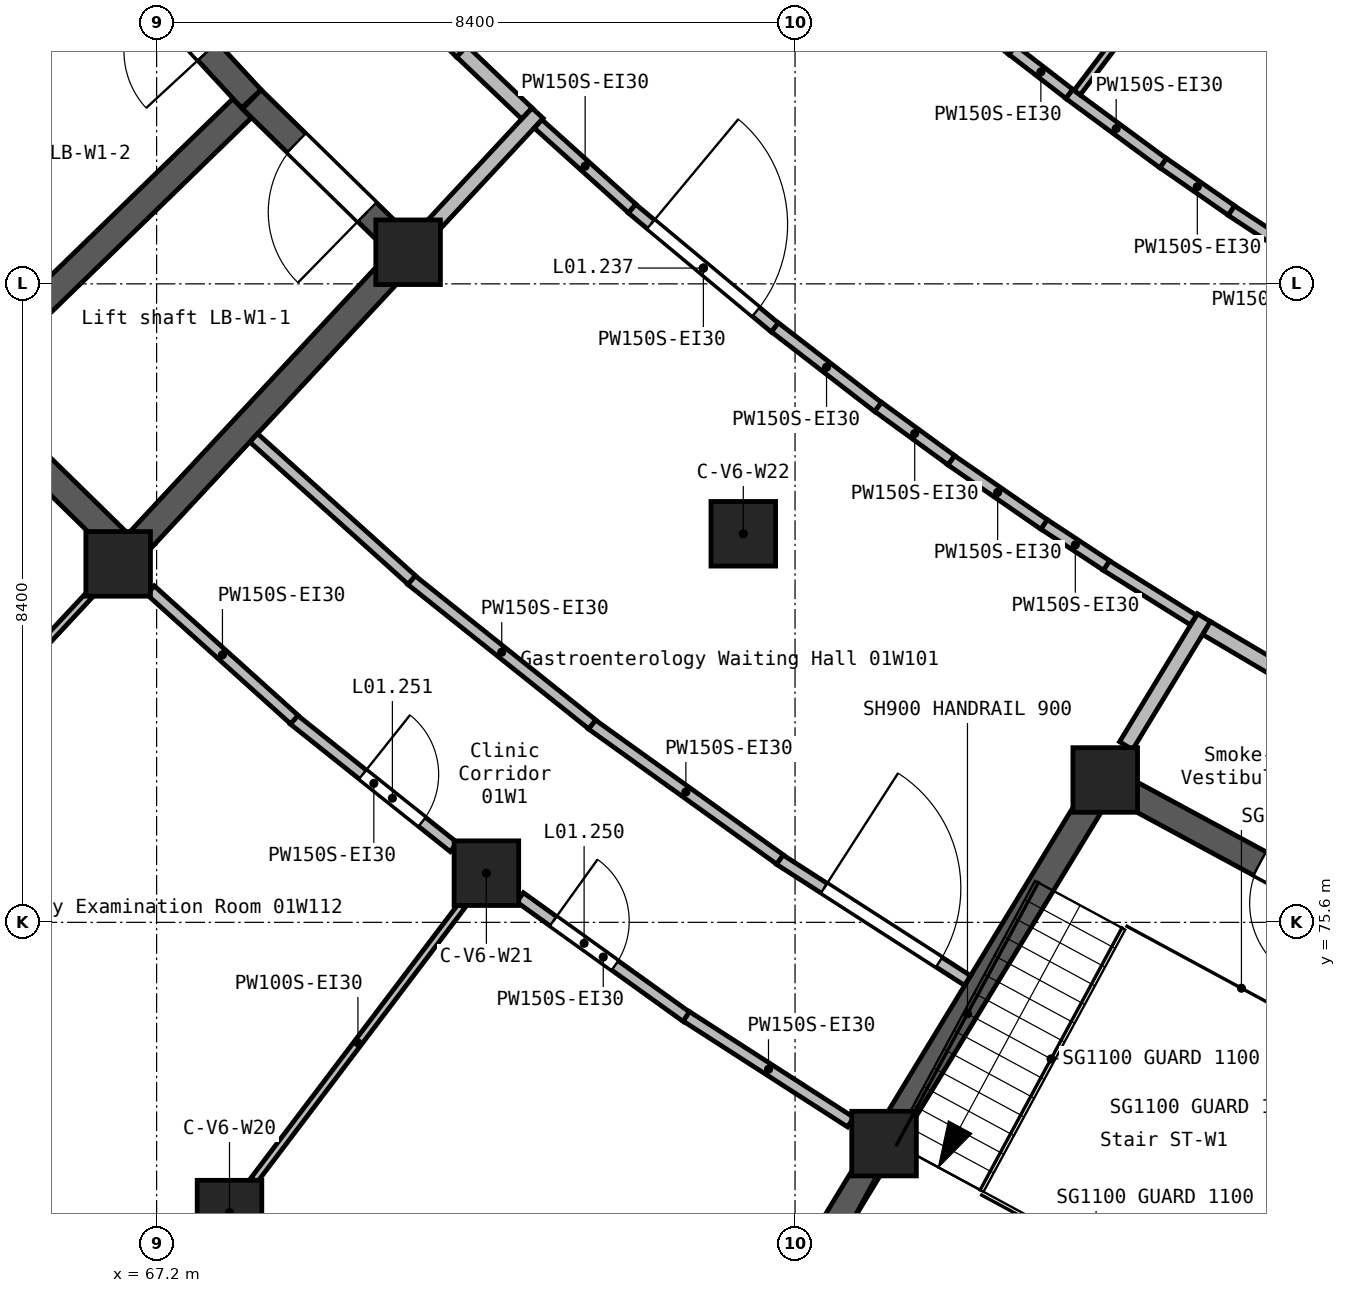
"""IFC4 building model, lengths in metres.
Left out: names, types, materials, properties, quantities, classifications, styles, units other than length and angle.
Written with IfcOpenShell. Run it as: python <this file> out.ifc"""

import sys

from ifc_helpers import new_model, si_unit, direction, frame, frame_2d, origin, origin_2d, place, context, subcontext, project, spatial, rectangle, extrude, element, fill, save


model = new_model("IFC4")
c1 = context("Model", 3, precision=1e-05, world=origin(), true_north=direction((0.0, 1.0)))
c2 = subcontext(c1, "Body", "Model", "MODEL_VIEW")
j1 = project(units=[si_unit("LENGTHUNIT", "METRE"), si_unit("PLANEANGLEUNIT", "RADIAN")], contexts=[c1])
p1 = place(None, origin())
s1 = spatial("IfcSite", under=j1, at=p1, CompositionType="ELEMENT")
p2 = place(p1, origin())
s2 = spatial("IfcBuilding", under=s1, at=p2, CompositionType="ELEMENT")
p3 = place(p2, frame((0.0, 0.0, 5.4)))
s3 = spatial("IfcBuildingStorey", under=s2, at=p3, CompositionType="ELEMENT", Elevation=5.4)
for number, where, z_axis, x_axis in (
    (1, (66.694, 80.316, 0.0), (0.0, 0.0, 1.0), (1.0, 0.0, 0.0)),
    (2, (68.159, 71.781, 0.0), (0.0, 0.0, 1.0), (1.0, 0.0, 0.0)),
    (3, (70.509, 84.416, 0.0), (0.0, 0.0, 1.0), (1.0, 0.0, 0.0)),
    (4, (71.539, 76.247, 0.0), (0.0, 0.0, 1.0), (1.0, 0.0, 0.0)),
    (5, (74.919, 80.712, 0.0), (0.0, 0.0, 1.0), (1.0, 0.0, 0.0)),
    (6, (76.771, 72.689, 0.0), (0.0, 0.0, 1.0), (1.0, 0.0, 0.0)),
    (7, (79.681, 77.473, 0.0), (0.0, 0.0, 1.0), (1.0, 0.0, 0.0)),
):
    element("IfcColumn", number, at=place(p3, frame(where, z_axis=z_axis, x_axis=x_axis)), inside=s3, PredefinedType="COLUMN", context=c2, shape_type="SweptSolid", body=[
        extrude(rectangle(XDim=0.85, YDim=0.85, at=origin_2d()), origin(), (0.0, 0.0, 1.0), 4.5),
    ])
p4 = place(p3, frame((62.305, 84.872, 0.0), z_axis=(0.0, 0.0, 1.0), x_axis=(0.751808220443, 0.659381831471, 0.0)))
e8 = element("IfcWall", 8, at=p4, inside=s3, PredefinedType="SHEAR", context=c2, shape_type="SweptSolid", body=[
    extrude(rectangle(XDim=5.75, YDim=0.35, at=frame_2d((2.875, 0.0))), origin(), (0.0, 0.0, 1.0), 4.5),
])
p5 = place(p3, frame((64.579, 82.666, 0.0), z_axis=(0.0, 0.0, 1.0), x_axis=(0.714695816666, -0.699435407769, 0.0)))
e9 = element("IfcWall", 9, at=p5, inside=s3, PredefinedType="SHEAR", context=c2, shape_type="SweptSolid", body=[
    extrude(rectangle(XDim=2.976, YDim=0.35, at=frame_2d((1.488, 0.0))), origin(), (0.0, 0.0, 1.0), 4.5),
])
p6 = place(p3, frame((64.702, 82.791, 0.0), z_axis=(0.0, 0.0, 1.0), x_axis=(0.717400873641, 0.696660596345, 0.0)))
e10 = element("IfcWall", 10, at=p6, inside=s3, PredefinedType="SHEAR", context=c2, shape_type="SweptSolid", body=[
    extrude(rectangle(XDim=5.05, YDim=0.35, at=frame_2d((2.525, 0.0))), origin(), (0.0, 0.0, 1.0), 4.5),
])
p7 = place(p3, frame((66.712, 80.334, 0.0), z_axis=(0.0, 0.0, 1.0), x_axis=(0.681084356202, 0.732204957465, 0.0)))
e11 = element("IfcWall", 11, at=p7, inside=s3, PredefinedType="SHEAR", context=c2, shape_type="SweptSolid", body=[
    extrude(rectangle(XDim=5.75, YDim=0.35, at=frame_2d((2.875, 0.0))), origin(), (0.0, 0.0, 1.0), 4.5),
])
p8 = place(p3, frame((68.447, 86.434, 0.0), z_axis=(0.0, 0.0, 1.0), x_axis=(-0.678058558992, 0.735007884704, 0.0)))
e12 = element("IfcWall", 12, at=p8, inside=s3, PredefinedType="SHEAR", context=c2, shape_type="SweptSolid", body=[
    extrude(rectangle(XDim=2.701, YDim=0.35, at=frame_2d((1.35, 0.0))), origin(), (0.0, 0.0, 1.0), 4.5),
])
p9 = place(p8, frame((0.85, 0.0, 0.0)))
e13 = element("IfcOpeningElement", 13, at=p9, cuts=e12, PredefinedType="OPENING", context=c2, shape_type="SweptSolid", body=[
    extrude(rectangle(XDim=1.1, YDim=2.1, at=frame_2d((0.55, 1.05))), frame((0.0, 0.185, 0.0), z_axis=(0.0, -1.0, 0.0), x_axis=(1.0, 0.0, 0.0)), (0.0, 0.0, 1.0), 0.37),
])
p10 = place(p3, frame((70.384, 84.538, 0.0), z_axis=(0.0, 0.0, 1.0), x_axis=(-0.714701443082, 0.699429658548, 0.0)))
e14 = element("IfcWall", 14, at=p10, inside=s3, PredefinedType="SHEAR", context=c2, shape_type="SweptSolid", body=[
    extrude(rectangle(XDim=2.702, YDim=0.35, at=frame_2d((1.351, 0.0))), origin(), (0.0, 0.0, 1.0), 4.5),
])
p11 = place(p10, frame((0.581, 0.0, 0.0)))
e15 = element("IfcOpeningElement", 15, at=p11, cuts=e14, PredefinedType="OPENING", context=c2, shape_type="SweptSolid", body=[
    extrude(rectangle(XDim=1.3, YDim=2.1, at=frame_2d((0.65, 1.05))), frame((0.0, 0.185, 0.0), z_axis=(0.0, -1.0, 0.0), x_axis=(1.0, 0.0, 0.0)), (0.0, 0.0, 1.0), 0.37),
])
p12 = place(p3, frame((75.848, 71.173, 0.0), z_axis=(0.0, 0.0, 1.0), x_axis=(0.51973149438, 0.854329663391, 0.0)))
e16 = element("IfcWall", 16, at=p12, inside=s3, PredefinedType="SHEAR", context=c2, shape_type="SweptSolid", body=[
    extrude(rectangle(XDim=7.55, YDim=0.35, at=frame_2d((3.775, 0.0))), origin(), (0.0, 0.0, 1.0), 4.5),
])
p13 = place(p3, frame((81.572, 68.077, 0.0), z_axis=(0.0, 0.0, 1.0), x_axis=(0.430592498036, 0.90254645345, 0.0)))
e17 = element("IfcWall", 17, at=p13, inside=s3, PredefinedType="SHEAR", context=c2, shape_type="SweptSolid", body=[
    extrude(rectangle(XDim=7.55, YDim=0.35, at=frame_2d((3.775, 0.0))), origin(), (0.0, 0.0, 1.0), 4.5),
])
p14 = place(p3, frame((84.593, 74.816, 0.0), z_axis=(0.0, 0.0, 1.0), x_axis=(-0.879585553739, 0.475740742058, 0.0)))
e18 = element("IfcWall", 18, at=p14, inside=s3, PredefinedType="SHEAR", context=c2, shape_type="SweptSolid", body=[
    extrude(rectangle(XDim=5.409, YDim=0.35, at=frame_2d((2.705, 0.0))), origin(), (0.0, 0.0, 1.0), 4.5),
])
p15 = place(p14, frame((2.174, 0.0, 0.0)))
e19 = element("IfcOpeningElement", 19, at=p15, cuts=e18, PredefinedType="OPENING", context=c2, shape_type="SweptSolid", body=[
    extrude(rectangle(XDim=1.1, YDim=2.1, at=frame_2d((0.55, 1.05))), frame((0.0, 0.185, 0.0), z_axis=(0.0, -1.0, 0.0), x_axis=(1.0, 0.0, 0.0)), (0.0, 0.0, 1.0), 0.37),
])
p16 = place(p3, frame((67.039, 70.31, 0.0), z_axis=(0.0, 0.0, 1.0), x_axis=(-0.76581638303, 0.64305930324, 0.0)))
e20 = element("IfcWall", 20, at=p16, inside=s3, PredefinedType="STANDARD", context=c2, shape_type="SweptSolid", body=[
    extrude(rectangle(XDim=7.072, YDim=0.2, at=frame_2d((3.536, 0.0))), origin(), (0.0, 0.0, 1.0), 3.35),
])
p17 = place(p16, frame((2.946, 0.0, 0.0)))
e21 = element("IfcOpeningElement", 21, at=p17, cuts=e20, PredefinedType="OPENING", context=c2, shape_type="SweptSolid", body=[
    extrude(rectangle(XDim=1.8, YDim=2.4, at=frame_2d((0.9, 1.2))), frame((0.0, 0.11, 0.0), z_axis=(0.0, -1.0, 0.0), x_axis=(1.0, 0.0, 0.0)), (0.0, 0.0, 1.0), 0.22),
])
p18 = place(p3, frame((70.837, 84.769, 0.0), z_axis=(0.0, 0.0, 1.0), x_axis=(0.681244203436, 0.732056237789, 0.0)))
e22 = element("IfcWall", 22, at=p18, inside=s3, PredefinedType="SOLIDWALL", context=c2, shape_type="SweptSolid", body=[
    extrude(rectangle(XDim=2.018, YDim=0.2, at=frame_2d((1.009, 0.0))), origin(), (0.0, 0.0, 1.0), 4.15),
])
p19 = place(p3, frame((79.955, 77.924, 0.0), z_axis=(0.0, 0.0, 1.0), x_axis=(0.519675881268, 0.85436349315, 0.0)))
e23 = element("IfcWall", 23, at=p19, inside=s3, PredefinedType="SOLIDWALL", context=c2, shape_type="SweptSolid", body=[
    extrude(rectangle(XDim=1.972, YDim=0.2, at=frame_2d((0.986, 0.0))), origin(), (0.0, 0.0, 1.0), 4.15),
])
p20 = place(p3, frame((70.101, 88.174, 0.0), z_axis=(0.0, 0.0, 1.0), x_axis=(0.705714994949, -0.708495833371, 0.0)))
e24 = element("IfcWall", 24, at=p20, inside=s3, PredefinedType="SOLIDWALL", context=c2, shape_type="SweptSolid", body=[
    extrude(rectangle(XDim=1.58, YDim=0.2, at=frame_2d((0.79, 0.0))), origin(), (0.0, 0.0, 1.0), 4.15),
])
p21 = place(p20, frame((0.19, 0.0, 0.0)))
e25 = element("IfcOpeningElement", 25, at=p21, cuts=e24, PredefinedType="OPENING", context=c2, shape_type="SweptSolid", body=[
    extrude(rectangle(XDim=1.2, YDim=2.1, at=frame_2d((0.6, 1.05))), frame((0.0, 0.11, 0.0), z_axis=(0.0, -1.0, 0.0), x_axis=(1.0, 0.0, 0.0)), (0.0, 0.0, 1.0), 0.22),
])
p22 = place(p3, frame((81.015, 79.471, 0.0), z_axis=(0.0, 0.0, 1.0), x_axis=(0.860926528214, -0.508729312127, 0.0)))
e26 = element("IfcWall", 26, at=p22, inside=s3, PredefinedType="SOLIDWALL", context=c2, shape_type="SweptSolid", body=[
    extrude(rectangle(XDim=1.379, YDim=0.2, at=frame_2d((0.689, 0.0))), origin(), (0.0, 0.0, 1.0), 4.15),
])
p23 = place(p3, frame((71.217, 87.058, 0.0), z_axis=(0.0, 0.0, 1.0), x_axis=(0.723660671666, -0.6901559478, 0.0)))
e27 = element("IfcWall", 27, at=p23, inside=s3, PredefinedType="SOLIDWALL", context=c2, shape_type="SweptSolid", body=[
    extrude(rectangle(XDim=1.18, YDim=0.2, at=frame_2d((0.59, 0.0))), origin(), (0.0, 0.0, 1.0), 4.15),
])
p24 = place(p3, frame((71.982, 75.929, 0.0), z_axis=(0.0, 0.0, 1.0), x_axis=(0.812329236441, -0.583199118332, 0.0)))
e28 = element("IfcWall", 28, at=p24, inside=s3, PredefinedType="PARTITIONING", context=c2, shape_type="SweptSolid", body=[
    extrude(rectangle(XDim=2.695, YDim=0.15, at=frame_2d((1.347, 0.0))), origin(), (0.0, 0.0, 1.0), 4.15),
])
p25 = place(p24, frame((0.537, 0.0, 0.0)))
e29 = element("IfcOpeningElement", 29, at=p25, cuts=e28, PredefinedType="OPENING", context=c2, shape_type="SweptSolid", body=[
    extrude(rectangle(XDim=1.0, YDim=2.1, at=frame_2d((0.5, 1.05))), frame((0.0, 0.085, 0.0), z_axis=(0.0, -1.0, 0.0), x_axis=(1.0, 0.0, 0.0)), (0.0, 0.0, 1.0), 0.17),
])
p26 = place(p3, frame((69.006, 78.267, 0.0), z_axis=(0.0, 0.0, 1.0), x_axis=(0.781841800916, -0.623476862715, 0.0)))
e30 = element("IfcWall", 30, at=p26, inside=s3, PredefinedType="PARTITIONING", context=c2, shape_type="SweptSolid", body=[
    extrude(rectangle(XDim=2.69, YDim=0.15, at=frame_2d((1.345, 0.0))), origin(), (0.0, 0.0, 1.0), 4.15),
])
p27 = place(p26, frame((1.157, 0.0, 0.0)))
e31 = element("IfcOpeningElement", 31, at=p27, cuts=e30, PredefinedType="OPENING", context=c2, shape_type="SweptSolid", body=[
    extrude(rectangle(XDim=1.0, YDim=2.1, at=frame_2d((0.5, 1.05))), frame((0.0, 0.085, 0.0), z_axis=(0.0, -1.0, 0.0), x_axis=(1.0, 0.0, 0.0)), (0.0, 0.0, 1.0), 0.17),
])
p28 = place(p3, frame((74.17, 74.362, 0.0), z_axis=(0.0, 0.0, 1.0), x_axis=(0.840928399131, -0.541146401203, 0.0)))
e32 = element("IfcWall", 32, at=p28, inside=s3, PredefinedType="PARTITIONING", context=c2, shape_type="SweptSolid", body=[
    extrude(rectangle(XDim=2.57, YDim=0.15, at=frame_2d((1.285, 0.0))), origin(), (0.0, 0.0, 1.0), 4.15),
])
p29 = place(p3, frame((67.12, 79.971, 0.0), z_axis=(0.0, 0.0, 1.0), x_axis=(0.743284610851, -0.668975326355, 0.0)))
e33 = element("IfcWall", 33, at=p29, inside=s3, PredefinedType="PARTITIONING", context=c2, shape_type="SweptSolid", body=[
    extrude(rectangle(XDim=2.546, YDim=0.15, at=frame_2d((1.273, 0.0))), origin(), (0.0, 0.0, 1.0), 4.15),
])
p30 = place(p3, frame((75.396, 76.427, 0.0), z_axis=(0.0, 0.0, 1.0), x_axis=(0.840919451001, -0.541160306128, 0.0)))
e34 = element("IfcWall", 34, at=p30, inside=s3, PredefinedType="PARTITIONING", context=c2, shape_type="SweptSolid", body=[
    extrude(rectangle(XDim=2.941, YDim=0.15, at=frame_2d((1.47, 0.0))), origin(), (0.0, 0.0, 1.0), 4.15),
])
p31 = place(p30, frame((0.697, 0.0, 0.0)))
e35 = element("IfcOpeningElement", 35, at=p31, cuts=e34, PredefinedType="OPENING", context=c2, shape_type="SweptSolid", body=[
    extrude(rectangle(XDim=1.8, YDim=2.1, at=frame_2d((0.9, 1.05))), frame((0.0, 0.085, 0.0), z_axis=(0.0, -1.0, 0.0), x_axis=(1.0, 0.0, 0.0)), (0.0, 0.0, 1.0), 0.17),
])
for number, where, z_axis, x_axis in (
    (36, (72.926, 78.204, 0.0), (0.0, 0.0, 1.0), (0.812, -0.583, 0.0)),
    (37, (70.55, 80.105, 0.0), (0.0, 0.0, 1.0), (0.782, -0.624, 0.0)),
):
    element("IfcWall", number, at=place(p3, frame(where, z_axis=z_axis, x_axis=x_axis)), inside=s3, PredefinedType="PARTITIONING", context=c2, shape_type="SweptSolid", body=[
        extrude(rectangle(XDim=3.046, YDim=0.15, at=frame_2d((1.523, 0.0))), origin(), (0.0, 0.0, 1.0), 4.15),
    ])
p32 = place(p3, frame((68.478, 81.974, 0.0), z_axis=(0.0, 0.0, 1.0), x_axis=(0.743546016741, -0.66868476952, 0.0)))
e38 = element("IfcWall", 38, at=p32, inside=s3, PredefinedType="PARTITIONING", context=c2, shape_type="SweptSolid", body=[
    extrude(rectangle(XDim=2.795, YDim=0.15, at=frame_2d((1.397, 0.0))), origin(), (0.0, 0.0, 1.0), 4.15),
])
p33 = place(p3, frame((73.452, 84.992, 0.0), z_axis=(0.0, 0.0, 1.0), x_axis=(0.768531506517, -0.639811943849, 0.0)))
e39 = element("IfcWall", 39, at=p33, inside=s3, PredefinedType="PARTITIONING", context=c2, shape_type="SweptSolid", body=[
    extrude(rectangle(XDim=2.45, YDim=0.15, at=frame_2d((1.225, 0.0))), origin(), (0.0, 0.0, 1.0), 4.15),
])
p34 = place(p33, frame((0.325, 0.0, 0.0)))
e40 = element("IfcOpeningElement", 40, at=p34, cuts=e39, PredefinedType="OPENING", context=c2, shape_type="SweptSolid", body=[
    extrude(rectangle(XDim=1.8, YDim=2.1, at=frame_2d((0.9, 1.05))), frame((0.0, 0.085, 0.0), z_axis=(0.0, -1.0, 0.0), x_axis=(1.0, 0.0, 0.0)), (0.0, 0.0, 1.0), 0.17),
])
p35 = place(p3, frame((72.22, 86.105, 0.0), z_axis=(0.0, 0.0, 1.0), x_axis=(0.743337937966, -0.668916070954, 0.0)))
e41 = element("IfcWall", 41, at=p35, inside=s3, PredefinedType="PARTITIONING", context=c2, shape_type="SweptSolid", body=[
    extrude(rectangle(XDim=1.663, YDim=0.15, at=frame_2d((0.832, 0.0))), origin(), (0.0, 0.0, 1.0), 4.15),
])
p36 = place(p3, frame((77.051, 88.236, 0.0), z_axis=(0.0, 0.0, 1.0), x_axis=(0.771517511576, -0.636208086502, 0.0)))
e42 = element("IfcWall", 42, at=p36, inside=s3, PredefinedType="PARTITIONING", context=c2, shape_type="SweptSolid", body=[
    extrude(rectangle(XDim=1.828, YDim=0.15, at=frame_2d((0.914, 0.0))), origin(), (0.0, 0.0, 1.0), 4.15),
])
p37 = place(p3, frame((75.335, 83.428, 0.0), z_axis=(0.0, 0.0, 1.0), x_axis=(0.791538398042, -0.611119435483, 0.0)))
e43 = element("IfcWall", 43, at=p37, inside=s3, PredefinedType="PARTITIONING", context=c2, shape_type="SweptSolid", body=[
    extrude(rectangle(XDim=1.716, YDim=0.15, at=frame_2d((0.858, 0.0))), origin(), (0.0, 0.0, 1.0), 4.15),
])
p38 = place(p3, frame((79.206, 86.5, 0.0), z_axis=(0.0, 0.0, 1.0), x_axis=(0.804960127747, -0.593328907721, 0.0)))
e44 = element("IfcWall", 44, at=p38, inside=s3, PredefinedType="PARTITIONING", context=c2, shape_type="SweptSolid", body=[
    extrude(rectangle(XDim=1.539, YDim=0.15, at=frame_2d((0.77, 0.0))), origin(), (0.0, 0.0, 1.0), 4.15),
])
p39 = place(p3, frame((79.695, 80.295, 0.0), z_axis=(0.0, 0.0, 1.0), x_axis=(0.847541618724, -0.530728936964, 0.0)))
e45 = element("IfcWall", 45, at=p39, inside=s3, PredefinedType="PARTITIONING", context=c2, shape_type="SweptSolid", body=[
    extrude(rectangle(XDim=1.353, YDim=0.15, at=frame_2d((0.676, 0.0))), origin(), (0.0, 0.0, 1.0), 4.15),
])
p40 = place(p3, frame((77.653, 81.68, 0.0), z_axis=(0.0, 0.0, 1.0), x_axis=(0.822646640465, -0.568552992194, 0.0)))
e46 = element("IfcWall", 46, at=p40, inside=s3, PredefinedType="PARTITIONING", context=c2, shape_type="SweptSolid", body=[
    extrude(rectangle(XDim=1.488, YDim=0.15, at=frame_2d((0.744, 0.0))), origin(), (0.0, 0.0, 1.0), 4.15),
])
p41 = place(p3, frame((76.693, 82.382, 0.0), z_axis=(0.0, 0.0, 1.0), x_axis=(0.808088805309, -0.589060678312, 0.0)))
e47 = element("IfcWall", 47, at=p41, inside=s3, PredefinedType="PARTITIONING", context=c2, shape_type="SweptSolid", body=[
    extrude(rectangle(XDim=1.192, YDim=0.15, at=frame_2d((0.596, 0.0))), origin(), (0.0, 0.0, 1.0), 4.15),
])
p42 = place(p3, frame((81.338, 84.965, 0.0), z_axis=(0.0, 0.0, 1.0), x_axis=(0.834958204617, -0.550313362134, 0.0)))
e48 = element("IfcWall", 48, at=p42, inside=s3, PredefinedType="PARTITIONING", context=c2, shape_type="SweptSolid", body=[
    extrude(rectangle(XDim=1.389, YDim=0.15, at=frame_2d((0.695, 0.0))), origin(), (0.0, 0.0, 1.0), 4.15),
])
p43 = place(p3, frame((80.444, 85.589, 0.0), z_axis=(0.0, 0.0, 1.0), x_axis=(0.821096473197, -0.570789437274, 0.0)))
e49 = element("IfcWall", 49, at=p43, inside=s3, PredefinedType="PARTITIONING", context=c2, shape_type="SweptSolid", body=[
    extrude(rectangle(XDim=1.093, YDim=0.15, at=frame_2d((0.546, 0.0))), origin(), (0.0, 0.0, 1.0), 4.15),
])
p44 = place(p3, frame((78.877, 80.836, 0.0), z_axis=(0.0, 0.0, 1.0), x_axis=(0.835209839134, -0.549931381733, 0.0)))
e50 = element("IfcWall", 50, at=p44, inside=s3, PredefinedType="PARTITIONING", context=c2, shape_type="SweptSolid", body=[
    extrude(rectangle(XDim=0.982, YDim=0.15, at=frame_2d((0.491, 0.0))), origin(), (0.0, 0.0, 1.0), 4.15),
])
p45 = place(p3, frame((78.46, 87.077, 0.0), z_axis=(0.0, 0.0, 1.0), x_axis=(0.791671493317, -0.610947008069, 0.0)))
e51 = element("IfcWall", 51, at=p45, inside=s3, PredefinedType="PARTITIONING", context=c2, shape_type="SweptSolid", body=[
    extrude(rectangle(XDim=0.944, YDim=0.15, at=frame_2d((0.472, 0.0))), origin(), (0.0, 0.0, 1.0), 4.15),
])
p46 = place(p3, frame((63.244, 76.607, 0.0), z_axis=(0.0, 0.0, 1.0), x_axis=(0.681263193371, 0.732038565485, 0.0)))
e52 = element("IfcWall", 52, at=p46, inside=s3, PredefinedType="PARTITIONING", context=c2, shape_type="SweptSolid", body=[
    extrude(rectangle(XDim=4.529, YDim=0.1, at=frame_2d((2.265, 0.0))), origin(), (0.0, 0.0, 1.0), 4.15),
])
p47 = place(p3, frame((68.483, 72.211, 0.0), z_axis=(0.0, 0.0, 1.0), x_axis=(0.603594766434, 0.797291262923, 0.0)))
e53 = element("IfcWall", 53, at=p47, inside=s3, PredefinedType="PARTITIONING", context=c2, shape_type="SweptSolid", body=[
    extrude(rectangle(XDim=4.524, YDim=0.1, at=frame_2d((2.262, 0.0))), origin(), (0.0, 0.0, 1.0), 4.15),
])
p48 = place(p3, frame((79.312, 86.515, 0.0), z_axis=(0.0, 0.0, 1.0), x_axis=(0.603588624137, 0.797295912954, 0.0)))
e54 = element("IfcWall", 54, at=p48, inside=s3, PredefinedType="PARTITIONING", context=c2, shape_type="SweptSolid", body=[
    extrude(rectangle(XDim=1.782, YDim=0.1, at=frame_2d((0.891, 0.0))), origin(), (0.0, 0.0, 1.0), 4.15),
])
p49 = place(p31, frame((1.8, 0.0, 0.0), z_axis=(0.0, 0.0, 1.0), x_axis=(-1.0, 0.0, 0.0)))
e55 = element("IfcDoor", 55, at=p49, inside=s3, OperationType="DOUBLE_DOOR_SINGLE_SWING", PredefinedType="DOOR", context=c2, shape_type="SweptSolid", body=[
    extrude(rectangle(XDim=1.8, YDim=2.1, at=frame_2d((0.9, 1.05))), frame((0.0, 0.025, 0.0), z_axis=(0.0, -1.0, 0.0), x_axis=(1.0, 0.0, 0.0)), (0.0, 0.0, 1.0), 0.05),
])
fill(e35, e55)
p50 = place(p34, origin())
e56 = element("IfcDoor", 56, at=p50, inside=s3, OperationType="DOUBLE_DOOR_SINGLE_SWING", PredefinedType="DOOR", context=c2, shape_type="SweptSolid", body=[
    extrude(rectangle(XDim=1.8, YDim=2.1, at=frame_2d((0.9, 1.05))), frame((0.0, 0.025, 0.0), z_axis=(0.0, -1.0, 0.0), x_axis=(1.0, 0.0, 0.0)), (0.0, 0.0, 1.0), 0.05),
])
fill(e40, e56)
p51 = place(p25, frame((1.0, 0.0, 0.0), z_axis=(0.0, 0.0, 1.0), x_axis=(-1.0, 0.0, 0.0)))
e57 = element("IfcDoor", 57, at=p51, inside=s3, OperationType="SINGLE_SWING_RIGHT", PredefinedType="DOOR", context=c2, shape_type="SweptSolid", body=[
    extrude(rectangle(XDim=1.0, YDim=2.1, at=frame_2d((0.5, 1.05))), frame((0.0, 0.025, 0.0), z_axis=(0.0, -1.0, 0.0), x_axis=(1.0, 0.0, 0.0)), (0.0, 0.0, 1.0), 0.05),
])
fill(e29, e57)
p52 = place(p27, frame((1.0, 0.0, 0.0), z_axis=(0.0, 0.0, 1.0), x_axis=(-1.0, 0.0, 0.0)))
e58 = element("IfcDoor", 58, at=p52, inside=s3, OperationType="SINGLE_SWING_LEFT", PredefinedType="DOOR", context=c2, shape_type="SweptSolid", body=[
    extrude(rectangle(XDim=1.0, YDim=2.1, at=frame_2d((0.5, 1.05))), frame((0.0, 0.025, 0.0), z_axis=(0.0, -1.0, 0.0), x_axis=(1.0, 0.0, 0.0)), (0.0, 0.0, 1.0), 0.05),
])
fill(e31, e58)
p53 = place(p15, origin())
e59 = element("IfcDoor", 59, at=p53, inside=s3, OperationType="SINGLE_SWING_RIGHT", PredefinedType="DOOR", context=c2, shape_type="SweptSolid", body=[
    extrude(rectangle(XDim=1.1, YDim=2.1, at=frame_2d((0.55, 1.05))), frame((0.0, 0.025, 0.0), z_axis=(0.0, -1.0, 0.0), x_axis=(1.0, 0.0, 0.0)), (0.0, 0.0, 1.0), 0.05),
])
fill(e19, e59)
p54 = place(p11, origin())
e60 = element("IfcDoor", 60, at=p54, inside=s3, OperationType="DOUBLE_DOOR_SLIDING", PredefinedType="DOOR", context=c2, shape_type="SweptSolid", body=[
    extrude(rectangle(XDim=1.3, YDim=2.1, at=frame_2d((0.65, 1.05))), frame((0.0, 0.025, 0.0), z_axis=(0.0, -1.0, 0.0), x_axis=(1.0, 0.0, 0.0)), (0.0, 0.0, 1.0), 0.05),
])
fill(e15, e60)
p55 = place(p9, origin())
e61 = element("IfcDoor", 61, at=p55, inside=s3, OperationType="DOUBLE_DOOR_SLIDING", PredefinedType="DOOR", context=c2, shape_type="SweptSolid", body=[
    extrude(rectangle(XDim=1.1, YDim=2.1, at=frame_2d((0.55, 1.05))), frame((0.0, 0.025, 0.0), z_axis=(0.0, -1.0, 0.0), x_axis=(1.0, 0.0, 0.0)), (0.0, 0.0, 1.0), 0.05),
])
fill(e13, e61)
save(model, sys.argv[1])
